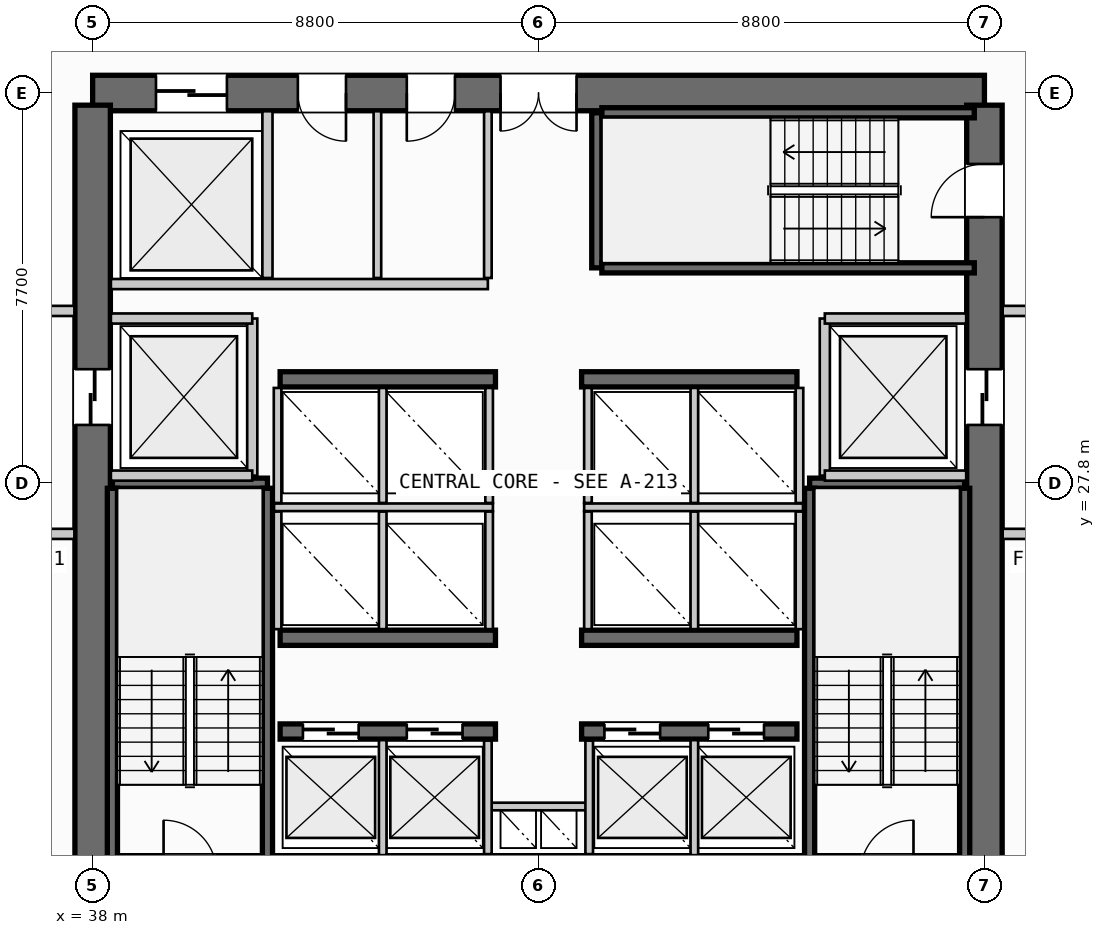
"""IFC4 building model, lengths in metres.
Left out: names, types, materials, properties, quantities, classifications, styles, units other than length and angle.
Written with IfcOpenShell. Run it as: python <this file> out.ifc"""

import sys

from ifc_helpers import new_model, si_unit, direction, frame, frame_2d, origin, place, context, subcontext, project, spatial, rectangle, extrude, source, transform, mapped, element, fill, save


model = new_model("IFC4")
c1 = context("Model", 3, precision=1e-05, world=origin(), true_north=direction((0.0, 1.0)))
c2 = subcontext(c1, "Body", "Model", "MODEL_VIEW")
j1 = project(units=[si_unit("LENGTHUNIT", "METRE"), si_unit("PLANEANGLEUNIT", "RADIAN")], contexts=[c1])
p1 = place(None, origin())
s1 = spatial("IfcSite", under=j1, at=p1, CompositionType="ELEMENT")
p2 = place(p1, origin())
s2 = spatial("IfcBuilding", under=s1, at=p2, CompositionType="ELEMENT")
p3 = place(p2, frame((0.0, 0.0, 92.8)))
s3 = spatial("IfcBuildingStorey", under=s2, at=p3, CompositionType="ELEMENT", Elevation=92.8)
p4 = place(p3, frame((38.0, 20.1, 0.0), z_axis=(0.0, 0.0, 1.0), x_axis=(1.0, 0.0, 0.0)))
e1 = element("IfcWall", 1, at=p4, inside=s3, PredefinedType="SHEAR", context=c2, shape_type="SweptSolid", body=[
    extrude(rectangle(XDim=17.6, YDim=0.7, at=frame_2d((8.8, 0.0))), origin(), (0.0, 0.0, 1.0), 3.35),
])
p5 = place(p4, frame((1.4, 0.0, 0.0)))
e2 = element("IfcOpeningElement", 2, at=p5, cuts=e1, PredefinedType="OPENING", context=c2, shape_type="SweptSolid", body=[
    extrude(rectangle(XDim=1.05, YDim=2.15, at=frame_2d((0.525, 1.075))), frame((0.0, 0.36, 0.0), z_axis=(0.0, -1.0, 0.0), x_axis=(1.0, 0.0, 0.0)), (0.0, 0.0, 1.0), 0.72),
])
p6 = place(p4, frame((15.15, 0.0, 0.0)))
e3 = element("IfcOpeningElement", 3, at=p6, cuts=e1, PredefinedType="OPENING", context=c2, shape_type="SweptSolid", body=[
    extrude(rectangle(XDim=1.05, YDim=2.15, at=frame_2d((0.525, 1.075))), frame((0.0, 0.36, 0.0), z_axis=(0.0, -1.0, 0.0), x_axis=(1.0, 0.0, 0.0)), (0.0, 0.0, 1.0), 0.72),
])
p7 = place(p3, frame((55.6, 35.5, 0.0), z_axis=(0.0, 0.0, 1.0), x_axis=(-1.0, 0.0, 0.0)))
e4 = element("IfcWall", 4, at=p7, inside=s3, PredefinedType="SHEAR", context=c2, shape_type="SweptSolid", body=[
    extrude(rectangle(XDim=17.6, YDim=0.7, at=frame_2d((8.8, 0.0))), origin(), (0.0, 0.0, 1.0), 3.35),
])
p8 = place(p7, frame((8.05, 0.0, 0.0)))
e5 = element("IfcOpeningElement", 5, at=p8, cuts=e4, PredefinedType="OPENING", context=c2, shape_type="SweptSolid", body=[
    extrude(rectangle(XDim=1.5, YDim=2.2, at=frame_2d((0.75, 1.1))), frame((0.0, 0.36, 0.0), z_axis=(0.0, -1.0, 0.0), x_axis=(1.0, 0.0, 0.0)), (0.0, 0.0, 1.0), 0.72),
])
p9 = place(p7, frame((14.95, 0.0, 0.0)))
e6 = element("IfcOpeningElement", 6, at=p9, cuts=e4, PredefinedType="OPENING", context=c2, shape_type="SweptSolid", body=[
    extrude(rectangle(XDim=1.4, YDim=2.3, at=frame_2d((0.7, 1.15))), frame((0.0, 0.36, 0.0), z_axis=(0.0, -1.0, 0.0), x_axis=(1.0, 0.0, 0.0)), (0.0, 0.0, 1.0), 0.72),
])
p10 = place(p7, frame((12.6, 0.0, 0.0)))
e7 = element("IfcOpeningElement", 7, at=p10, cuts=e4, PredefinedType="OPENING", context=c2, shape_type="SweptSolid", body=[
    extrude(rectangle(XDim=0.95, YDim=2.15, at=frame_2d((0.475, 1.075))), frame((0.0, 0.36, 0.0), z_axis=(0.0, -1.0, 0.0), x_axis=(1.0, 0.0, 0.0)), (0.0, 0.0, 1.0), 0.72),
])
p11 = place(p7, frame((10.45, 0.0, 0.0)))
e8 = element("IfcOpeningElement", 8, at=p11, cuts=e4, PredefinedType="OPENING", context=c2, shape_type="SweptSolid", body=[
    extrude(rectangle(XDim=0.95, YDim=2.15, at=frame_2d((0.475, 1.075))), frame((0.0, 0.36, 0.0), z_axis=(0.0, -1.0, 0.0), x_axis=(1.0, 0.0, 0.0)), (0.0, 0.0, 1.0), 0.72),
])
p12 = place(p3, frame((38.0, 35.26, 0.0), z_axis=(0.0, 0.0, 1.0), x_axis=(0.0, -1.0, 0.0)))
e9 = element("IfcWall", 9, at=p12, inside=s3, PredefinedType="SHEAR", context=c2, shape_type="SweptSolid", body=[
    extrude(rectangle(XDim=14.92, YDim=0.7, at=frame_2d((7.46, 0.0))), origin(), (0.0, 0.0, 1.0), 3.35),
])
p13 = place(p12, frame((5.21, 0.0, 0.0)))
e10 = element("IfcOpeningElement", 10, at=p13, cuts=e9, PredefinedType="OPENING", context=c2, shape_type="SweptSolid", body=[
    extrude(rectangle(XDim=1.1, YDim=2.2, at=frame_2d((0.55, 1.1))), frame((0.0, 0.36, 0.0), z_axis=(0.0, -1.0, 0.0), x_axis=(1.0, 0.0, 0.0)), (0.0, 0.0, 1.0), 0.72),
])
p14 = place(p3, frame((55.6, 20.34, 0.0), z_axis=(0.0, 0.0, 1.0), x_axis=(0.0, 1.0, 0.0)))
e11 = element("IfcWall", 11, at=p14, inside=s3, PredefinedType="SHEAR", context=c2, shape_type="SweptSolid", body=[
    extrude(rectangle(XDim=14.92, YDim=0.7, at=frame_2d((7.46, 0.0))), origin(), (0.0, 0.0, 1.0), 3.35),
])
p15 = place(p14, frame((12.71, 0.0, 0.0)))
e12 = element("IfcOpeningElement", 12, at=p15, cuts=e11, PredefinedType="OPENING", context=c2, shape_type="SweptSolid", body=[
    extrude(rectangle(XDim=1.05, YDim=2.15, at=frame_2d((0.525, 1.075))), frame((0.0, 0.36, 0.0), z_axis=(0.0, -1.0, 0.0), x_axis=(1.0, 0.0, 0.0)), (0.0, 0.0, 1.0), 0.72),
])
p16 = place(p14, frame((8.61, 0.0, 0.0)))
e13 = element("IfcOpeningElement", 13, at=p16, cuts=e11, PredefinedType="OPENING", context=c2, shape_type="SweptSolid", body=[
    extrude(rectangle(XDim=1.1, YDim=2.2, at=frame_2d((0.55, 1.1))), frame((0.0, 0.36, 0.0), z_axis=(0.0, -1.0, 0.0), x_axis=(1.0, 0.0, 0.0)), (0.0, 0.0, 1.0), 0.72),
])
p17 = place(p3, frame((41.7, 22.9, 0.0), z_axis=(0.0, 0.0, 1.0), x_axis=(1.0, 0.0, 0.0)))
e14 = element("IfcWall", 14, at=p17, inside=s3, PredefinedType="SHEAR", context=c2, shape_type="SweptSolid", body=[
    extrude(rectangle(XDim=4.25, YDim=0.3, at=frame_2d((2.125, 0.0))), origin(), (0.0, 0.0, 1.0), 3.35),
])
p18 = place(p17, frame((0.45, 0.0, 0.0)))
e15 = element("IfcOpeningElement", 15, at=p18, cuts=e14, PredefinedType="OPENING", context=c2, shape_type="SweptSolid", body=[
    extrude(rectangle(XDim=1.1, YDim=2.2, at=frame_2d((0.55, 1.1))), frame((0.0, 0.16, 0.0), z_axis=(0.0, -1.0, 0.0), x_axis=(1.0, 0.0, 0.0)), (0.0, 0.0, 1.0), 0.32),
])
p19 = place(p17, frame((2.5, 0.0, 0.0)))
e16 = element("IfcOpeningElement", 16, at=p19, cuts=e14, PredefinedType="OPENING", context=c2, shape_type="SweptSolid", body=[
    extrude(rectangle(XDim=1.1, YDim=2.2, at=frame_2d((0.55, 1.1))), frame((0.0, 0.16, 0.0), z_axis=(0.0, -1.0, 0.0), x_axis=(1.0, 0.0, 0.0)), (0.0, 0.0, 1.0), 0.32),
])
p20 = place(p3, frame((47.65, 22.9, 0.0), z_axis=(0.0, 0.0, 1.0), x_axis=(1.0, 0.0, 0.0)))
e17 = element("IfcWall", 17, at=p20, inside=s3, PredefinedType="SHEAR", context=c2, shape_type="SweptSolid", body=[
    extrude(rectangle(XDim=4.25, YDim=0.3, at=frame_2d((2.125, 0.0))), origin(), (0.0, 0.0, 1.0), 3.35),
])
p21 = place(p20, frame((0.45, 0.0, 0.0)))
e18 = element("IfcOpeningElement", 18, at=p21, cuts=e17, PredefinedType="OPENING", context=c2, shape_type="SweptSolid", body=[
    extrude(rectangle(XDim=1.1, YDim=2.2, at=frame_2d((0.55, 1.1))), frame((0.0, 0.16, 0.0), z_axis=(0.0, -1.0, 0.0), x_axis=(1.0, 0.0, 0.0)), (0.0, 0.0, 1.0), 0.32),
])
p22 = place(p20, frame((2.5, 0.0, 0.0)))
e19 = element("IfcOpeningElement", 19, at=p22, cuts=e17, PredefinedType="OPENING", context=c2, shape_type="SweptSolid", body=[
    extrude(rectangle(XDim=1.1, YDim=2.2, at=frame_2d((0.55, 1.1))), frame((0.0, 0.16, 0.0), z_axis=(0.0, -1.0, 0.0), x_axis=(1.0, 0.0, 0.0)), (0.0, 0.0, 1.0), 0.32),
])
for number, where, z_axis, x_axis in (
    (20, (41.7, 24.75, 0.0), (0.0, 0.0, 1.0), (1.0, 0.0, 0.0)),
    (21, (47.65, 24.75, 0.0), (0.0, 0.0, 1.0), (1.0, 0.0, 0.0)),
    (22, (41.7, 29.85, 0.0), (0.0, 0.0, 1.0), (1.0, 0.0, 0.0)),
    (23, (47.65, 29.85, 0.0), (0.0, 0.0, 1.0), (1.0, 0.0, 0.0)),
):
    element("IfcWall", number, at=place(p3, frame(where, z_axis=z_axis, x_axis=x_axis)), inside=s3, PredefinedType="SHEAR", context=c2, shape_type="SweptSolid", body=[
        extrude(rectangle(XDim=4.25, YDim=0.3, at=frame_2d((2.125, 0.0))), origin(), (0.0, 0.0, 1.0), 3.35),
    ])
p23 = place(p3, frame((38.39, 27.8, 0.0), z_axis=(0.0, 0.0, 1.0), x_axis=(1.0, 0.0, 0.0)))
e24 = element("IfcWall", 24, at=p23, inside=s3, PredefinedType="SHEAR", context=c2, shape_type="SweptSolid", body=[
    extrude(rectangle(XDim=3.06, YDim=0.2, at=frame_2d((1.53, 0.0))), origin(), (0.0, 0.0, 1.0), 3.35),
])
for number, where, z_axis, x_axis in (
    (25, (41.45, 27.7, 0.0), (0.0, 0.0, 1.0), (0.0, -1.0, 0.0)),
    (26, (38.39, 20.35, 0.0), (0.0, 0.0, 1.0), (0.0, 1.0, 0.0)),
):
    element("IfcWall", number, at=place(p3, frame(where, z_axis=z_axis, x_axis=x_axis)), inside=s3, PredefinedType="SHEAR", context=c2, shape_type="SweptSolid", body=[
        extrude(rectangle(XDim=7.35, YDim=0.2, at=frame_2d((3.675, 0.0))), origin(), (0.0, 0.0, 1.0), 3.35),
    ])
p24 = place(p3, frame((52.15, 27.8, 0.0), z_axis=(0.0, 0.0, 1.0), x_axis=(1.0, 0.0, 0.0)))
e27 = element("IfcWall", 27, at=p24, inside=s3, PredefinedType="SHEAR", context=c2, shape_type="SweptSolid", body=[
    extrude(rectangle(XDim=3.06, YDim=0.2, at=frame_2d((1.53, 0.0))), origin(), (0.0, 0.0, 1.0), 3.35),
])
for number, where, z_axis, x_axis in (
    (28, (55.21, 27.7, 0.0), (0.0, 0.0, 1.0), (0.0, -1.0, 0.0)),
    (29, (52.15, 20.35, 0.0), (0.0, 0.0, 1.0), (0.0, 1.0, 0.0)),
):
    element("IfcWall", number, at=place(p3, frame(where, z_axis=z_axis, x_axis=x_axis)), inside=s3, PredefinedType="SHEAR", context=c2, shape_type="SweptSolid", body=[
        extrude(rectangle(XDim=7.35, YDim=0.2, at=frame_2d((3.675, 0.0))), origin(), (0.0, 0.0, 1.0), 3.35),
    ])
p25 = place(p3, frame((47.95, 32.05, 0.0), z_axis=(0.0, 0.0, 1.0), x_axis=(0.0, 1.0, 0.0)))
e30 = element("IfcWall", 30, at=p25, inside=s3, PredefinedType="SHEAR", context=c2, shape_type="SweptSolid", body=[
    extrude(rectangle(XDim=3.06, YDim=0.2, at=frame_2d((1.53, 0.0))), origin(), (0.0, 0.0, 1.0), 3.35),
])
for number, where, z_axis, x_axis in (
    (31, (48.05, 35.11, 0.0), (0.0, 0.0, 1.0), (1.0, 0.0, 0.0)),
    (32, (55.4, 32.05, 0.0), (0.0, 0.0, 1.0), (-1.0, 0.0, 0.0)),
):
    element("IfcWall", number, at=place(p3, frame(where, z_axis=z_axis, x_axis=x_axis)), inside=s3, PredefinedType="SHEAR", context=c2, shape_type="SweptSolid", body=[
        extrude(rectangle(XDim=7.35, YDim=0.2, at=frame_2d((3.675, 0.0))), origin(), (0.0, 0.0, 1.0), 3.35),
    ])
p26 = place(p3, frame((45.8, 21.42, 0.0), z_axis=(0.0, 0.0, 1.0), x_axis=(1.0, 0.0, 0.0)))
e33 = element("IfcWall", 33, at=p26, inside=s3, PredefinedType="PARTITIONING", context=c2, shape_type="SweptSolid", body=[
    extrude(rectangle(XDim=2.0, YDim=0.15, at=frame_2d((1.0, 0.0))), origin(), (0.0, 0.0, 1.0), 2.28),
])
for number, where, z_axis, x_axis in (
    (34, (45.8, 20.48, 0.0), (0.0, 0.0, 1.0), (0.0, 1.0, 0.0)),
    (35, (47.8, 20.48, 0.0), (0.0, 0.0, 1.0), (0.0, 1.0, 0.0)),
):
    element("IfcWall", number, at=place(p3, frame(where, z_axis=z_axis, x_axis=x_axis)), inside=s3, PredefinedType="PARTITIONING", context=c2, shape_type="SweptSolid", body=[
        extrude(rectangle(XDim=2.24, YDim=0.15, at=frame_2d((1.12, 0.0))), origin(), (0.0, 0.0, 1.0), 2.28),
    ])
p27 = place(p3, frame((41.15, 27.95, 0.0), z_axis=(0.0, 0.0, 1.0), x_axis=(0.0, 1.0, 0.0)))
e36 = element("IfcWall", 36, at=p27, inside=s3, PredefinedType="PARTITIONING", context=c2, shape_type="SweptSolid", body=[
    extrude(rectangle(XDim=3.1, YDim=0.2, at=frame_2d((1.55, 0.0))), origin(), (0.0, 0.0, 1.0), 2.28),
])
for number, where, z_axis, x_axis in (
    (37, (38.36, 27.95, 0.0), (0.0, 0.0, 1.0), (1.0, 0.0, 0.0)),
    (38, (38.36, 31.05, 0.0), (0.0, 0.0, 1.0), (1.0, 0.0, 0.0)),
):
    element("IfcWall", number, at=place(p3, frame(where, z_axis=z_axis, x_axis=x_axis)), inside=s3, PredefinedType="PARTITIONING", context=c2, shape_type="SweptSolid", body=[
        extrude(rectangle(XDim=2.79, YDim=0.2, at=frame_2d((1.395, 0.0))), origin(), (0.0, 0.0, 1.0), 2.28),
    ])
for number, where, z_axis, x_axis in (
    (39, (34.5, 26.8, 0.0), (0.0, 0.0, 1.0), (1.0, 0.0, 0.0)),
    (40, (34.5, 31.2, 0.0), (0.0, 0.0, 1.0), (1.0, 0.0, 0.0)),
):
    element("IfcWall", number, at=place(p3, frame(where, z_axis=z_axis, x_axis=x_axis)), inside=s3, PredefinedType="PARTITIONING", context=c2, shape_type="SweptSolid", body=[
        extrude(rectangle(XDim=3.14, YDim=0.2, at=frame_2d((1.57, 0.0))), origin(), (0.0, 0.0, 1.0), 2.28),
    ])
p28 = place(p3, frame((52.45, 27.95, 0.0), z_axis=(0.0, 0.0, 1.0), x_axis=(0.0, 1.0, 0.0)))
e41 = element("IfcWall", 41, at=p28, inside=s3, PredefinedType="PARTITIONING", context=c2, shape_type="SweptSolid", body=[
    extrude(rectangle(XDim=3.1, YDim=0.2, at=frame_2d((1.55, 0.0))), origin(), (0.0, 0.0, 1.0), 2.28),
])
for number, where, z_axis, x_axis in (
    (42, (52.45, 27.95, 0.0), (0.0, 0.0, 1.0), (1.0, 0.0, 0.0)),
    (43, (52.45, 31.05, 0.0), (0.0, 0.0, 1.0), (1.0, 0.0, 0.0)),
):
    element("IfcWall", number, at=place(p3, frame(where, z_axis=z_axis, x_axis=x_axis)), inside=s3, PredefinedType="PARTITIONING", context=c2, shape_type="SweptSolid", body=[
        extrude(rectangle(XDim=2.79, YDim=0.2, at=frame_2d((1.395, 0.0))), origin(), (0.0, 0.0, 1.0), 2.28),
    ])
for number, where, z_axis, x_axis in (
    (44, (55.96, 26.8, 0.0), (0.0, 0.0, 1.0), (1.0, 0.0, 0.0)),
    (45, (55.96, 31.2, 0.0), (0.0, 0.0, 1.0), (1.0, 0.0, 0.0)),
):
    element("IfcWall", number, at=place(p3, frame(where, z_axis=z_axis, x_axis=x_axis)), inside=s3, PredefinedType="PARTITIONING", context=c2, shape_type="SweptSolid", body=[
        extrude(rectangle(XDim=3.14, YDim=0.2, at=frame_2d((1.57, 0.0))), origin(), (0.0, 0.0, 1.0), 2.28),
    ])
for number, where, z_axis, x_axis in (
    (46, (43.725, 20.46, 0.0), (0.0, 0.0, 1.0), (0.0, 1.0, 0.0)),
    (47, (49.875, 20.46, 0.0), (0.0, 0.0, 1.0), (0.0, 1.0, 0.0)),
):
    element("IfcWall", number, at=place(p3, frame(where, z_axis=z_axis, x_axis=x_axis)), inside=s3, PredefinedType="PARTITIONING", context=c2, shape_type="SweptSolid", body=[
        extrude(rectangle(XDim=2.27, YDim=0.15, at=frame_2d((1.135, 0.0))), origin(), (0.0, 0.0, 1.0), 2.28),
    ])
p29 = place(p3, frame((41.58, 27.325, 0.0), z_axis=(0.0, 0.0, 1.0), x_axis=(1.0, 0.0, 0.0)))
e48 = element("IfcWall", 48, at=p29, inside=s3, PredefinedType="PARTITIONING", context=c2, shape_type="SweptSolid", body=[
    extrude(rectangle(XDim=4.32, YDim=0.15, at=frame_2d((2.16, 0.0))), origin(), (0.0, 0.0, 1.0), 2.28),
])
p30 = place(p3, frame((47.7, 27.325, 0.0), z_axis=(0.0, 0.0, 1.0), x_axis=(1.0, 0.0, 0.0)))
e49 = element("IfcWall", 49, at=p30, inside=s3, PredefinedType="PARTITIONING", context=c2, shape_type="SweptSolid", body=[
    extrude(rectangle(XDim=4.32, YDim=0.15, at=frame_2d((2.16, 0.0))), origin(), (0.0, 0.0, 1.0), 2.28),
])
for number, where, z_axis, x_axis in (
    (50, (41.65, 24.92, 0.0), (0.0, 0.0, 1.0), (0.0, 1.0, 0.0)),
    (51, (43.725, 24.92, 0.0), (0.0, 0.0, 1.0), (0.0, 1.0, 0.0)),
    (52, (45.825, 24.92, 0.0), (0.0, 0.0, 1.0), (0.0, 1.0, 0.0)),
    (53, (47.775, 24.92, 0.0), (0.0, 0.0, 1.0), (0.0, 1.0, 0.0)),
    (54, (49.875, 24.92, 0.0), (0.0, 0.0, 1.0), (0.0, 1.0, 0.0)),
    (55, (51.95, 24.92, 0.0), (0.0, 0.0, 1.0), (0.0, 1.0, 0.0)),
):
    element("IfcWall", number, at=place(p3, frame(where, z_axis=z_axis, x_axis=x_axis)), inside=s3, PredefinedType="PARTITIONING", context=c2, shape_type="SweptSolid", body=[
        extrude(rectangle(XDim=2.32, YDim=0.15, at=frame_2d((1.16, 0.0))), origin(), (0.0, 0.0, 1.0), 2.28),
    ])
for number, where, z_axis, x_axis in (
    (56, (41.65, 27.41, 0.0), (0.0, 0.0, 1.0), (0.0, 1.0, 0.0)),
    (57, (43.725, 27.41, 0.0), (0.0, 0.0, 1.0), (0.0, 1.0, 0.0)),
    (58, (45.825, 27.41, 0.0), (0.0, 0.0, 1.0), (0.0, 1.0, 0.0)),
    (59, (47.775, 27.41, 0.0), (0.0, 0.0, 1.0), (0.0, 1.0, 0.0)),
    (60, (49.875, 27.41, 0.0), (0.0, 0.0, 1.0), (0.0, 1.0, 0.0)),
    (61, (51.95, 27.41, 0.0), (0.0, 0.0, 1.0), (0.0, 1.0, 0.0)),
):
    element("IfcWall", number, at=place(p3, frame(where, z_axis=z_axis, x_axis=x_axis)), inside=s3, PredefinedType="PARTITIONING", context=c2, shape_type="SweptSolid", body=[
        extrude(rectangle(XDim=2.27, YDim=0.15, at=frame_2d((1.135, 0.0))), origin(), (0.0, 0.0, 1.0), 2.28),
    ])
p31 = place(p3, frame((41.45, 31.85, 0.0), z_axis=(0.0, 0.0, 1.0), x_axis=(0.0, 1.0, 0.0)))
e62 = element("IfcWall", 62, at=p31, inside=s3, PredefinedType="PARTITIONING", context=c2, shape_type="SweptSolid", body=[
    extrude(rectangle(XDim=3.29, YDim=0.2, at=frame_2d((1.645, 0.0))), origin(), (0.0, 0.0, 1.0), 2.28),
])
p32 = place(p3, frame((38.36, 31.73, 0.0), z_axis=(0.0, 0.0, 1.0), x_axis=(1.0, 0.0, 0.0)))
e63 = element("IfcWall", 63, at=p32, inside=s3, PredefinedType="PARTITIONING", context=c2, shape_type="SweptSolid", body=[
    extrude(rectangle(XDim=7.44, YDim=0.2, at=frame_2d((3.72, 0.0))), origin(), (0.0, 0.0, 1.0), 2.28),
])
p33 = place(p3, frame((45.8, 31.85, 0.0), z_axis=(0.0, 0.0, 1.0), x_axis=(0.0, 1.0, 0.0)))
e64 = element("IfcWall", 64, at=p33, inside=s3, PredefinedType="PARTITIONING", context=c2, shape_type="SweptSolid", body=[
    extrude(rectangle(XDim=3.29, YDim=0.15, at=frame_2d((1.645, 0.0))), origin(), (0.0, 0.0, 1.0), 2.28),
])
p34 = place(p3, frame((43.62, 31.85, 0.0), z_axis=(0.0, 0.0, 1.0), x_axis=(0.0, 1.0, 0.0)))
e65 = element("IfcWall", 65, at=p34, inside=s3, PredefinedType="PLUMBINGWALL", context=c2, shape_type="SweptSolid", body=[
    extrude(rectangle(XDim=3.29, YDim=0.15, at=frame_2d((1.645, 0.0))), origin(), (0.0, 0.0, 1.0), 2.28),
])
m1 = source(origin(), c2, "Body", "SweptSolid", [
    extrude(rectangle(XDim=1.05, YDim=2.15, at=frame_2d((0.525, 1.075))), frame((0.0, 0.025, 0.0), z_axis=(0.0, -1.0, 0.0), x_axis=(1.0, 0.0, 0.0)), (0.0, 0.0, 1.0), 0.05),
])
p35 = place(p15, origin())
e66 = element("IfcDoor", 66, at=p35, inside=s3, OperationType="SINGLE_SWING_LEFT", PredefinedType="DOOR", context=c2, shape_type="MappedRepresentation", body=[
    mapped(m1, transform((0.0, 0.0, 0.0), scale=1.0)),
])
fill(e12, e66)
m2 = source(origin(), c2, "Body", "SweptSolid", [
    extrude(rectangle(XDim=1.5, YDim=2.2, at=frame_2d((0.75, 1.1))), frame((0.0, 0.025, 0.0), z_axis=(0.0, -1.0, 0.0), x_axis=(1.0, 0.0, 0.0)), (0.0, 0.0, 1.0), 0.05),
])
p36 = place(p8, origin())
e67 = element("IfcDoor", 67, at=p36, inside=s3, OperationType="DOUBLE_DOOR_SINGLE_SWING", PredefinedType="DOOR", context=c2, shape_type="MappedRepresentation", body=[
    mapped(m2, transform((0.0, 0.0, 0.0), scale=1.0)),
])
fill(e5, e67)
m3 = source(origin(), c2, "Body", "SweptSolid", [
    extrude(rectangle(XDim=1.1, YDim=2.2, at=frame_2d((0.55, 1.1))), frame((0.0, 0.025, 0.0), z_axis=(0.0, -1.0, 0.0), x_axis=(1.0, 0.0, 0.0)), (0.0, 0.0, 1.0), 0.05),
])
p37 = place(p13, origin())
e68 = element("IfcDoor", 68, at=p37, inside=s3, OperationType="SLIDING_TO_LEFT", PredefinedType="DOOR", context=c2, shape_type="MappedRepresentation", body=[
    mapped(m3, transform((0.0, 0.0, 0.0), scale=1.0)),
])
fill(e10, e68)
p38 = place(p16, origin())
e69 = element("IfcDoor", 69, at=p38, inside=s3, OperationType="SLIDING_TO_RIGHT", PredefinedType="DOOR", context=c2, shape_type="MappedRepresentation", body=[
    mapped(m3, transform((0.0, 0.0, 0.0), scale=1.0)),
])
fill(e13, e69)
p39 = place(p18, origin())
e70 = element("IfcDoor", 70, at=p39, inside=s3, OperationType="SLIDING_TO_LEFT", PredefinedType="DOOR", context=c2, shape_type="MappedRepresentation", body=[
    mapped(m3, transform((0.0, 0.0, 0.0), scale=1.0)),
])
fill(e15, e70)
p40 = place(p19, origin())
e71 = element("IfcDoor", 71, at=p40, inside=s3, OperationType="SLIDING_TO_LEFT", PredefinedType="DOOR", context=c2, shape_type="MappedRepresentation", body=[
    mapped(m3, transform((0.0, 0.0, 0.0), scale=1.0)),
])
fill(e16, e71)
p41 = place(p21, origin())
e72 = element("IfcDoor", 72, at=p41, inside=s3, OperationType="SLIDING_TO_LEFT", PredefinedType="DOOR", context=c2, shape_type="MappedRepresentation", body=[
    mapped(m3, transform((0.0, 0.0, 0.0), scale=1.0)),
])
fill(e18, e72)
p42 = place(p22, origin())
e73 = element("IfcDoor", 73, at=p42, inside=s3, OperationType="SLIDING_TO_LEFT", PredefinedType="DOOR", context=c2, shape_type="MappedRepresentation", body=[
    mapped(m3, transform((0.0, 0.0, 0.0), scale=1.0)),
])
fill(e19, e73)
m4 = source(origin(), c2, "Body", "SweptSolid", [
    extrude(rectangle(XDim=1.4, YDim=2.3, at=frame_2d((0.7, 1.15))), frame((0.0, 0.025, 0.0), z_axis=(0.0, -1.0, 0.0), x_axis=(1.0, 0.0, 0.0)), (0.0, 0.0, 1.0), 0.05),
])
p43 = place(p9, origin())
e74 = element("IfcDoor", 74, at=p43, inside=s3, OperationType="SLIDING_TO_RIGHT", PredefinedType="DOOR", context=c2, shape_type="MappedRepresentation", body=[
    mapped(m4, transform((0.0, 0.0, 0.0), scale=1.0)),
])
fill(e6, e74)
m5 = source(origin(), c2, "Body", "SweptSolid", [
    extrude(rectangle(XDim=0.95, YDim=2.15, at=frame_2d((0.475, 1.075))), frame((0.0, 0.025, 0.0), z_axis=(0.0, -1.0, 0.0), x_axis=(1.0, 0.0, 0.0)), (0.0, 0.0, 1.0), 0.05),
])
p44 = place(p10, origin())
e75 = element("IfcDoor", 75, at=p44, inside=s3, OperationType="SINGLE_SWING_LEFT", PredefinedType="DOOR", context=c2, shape_type="MappedRepresentation", body=[
    mapped(m5, transform((0.0, 0.0, 0.0), scale=1.0)),
])
fill(e7, e75)
p45 = place(p11, origin())
e76 = element("IfcDoor", 76, at=p45, inside=s3, OperationType="SINGLE_SWING_RIGHT", PredefinedType="DOOR", context=c2, shape_type="MappedRepresentation", body=[
    mapped(m5, transform((0.0, 0.0, 0.0), scale=1.0)),
])
fill(e8, e76)
save(model, sys.argv[1])
